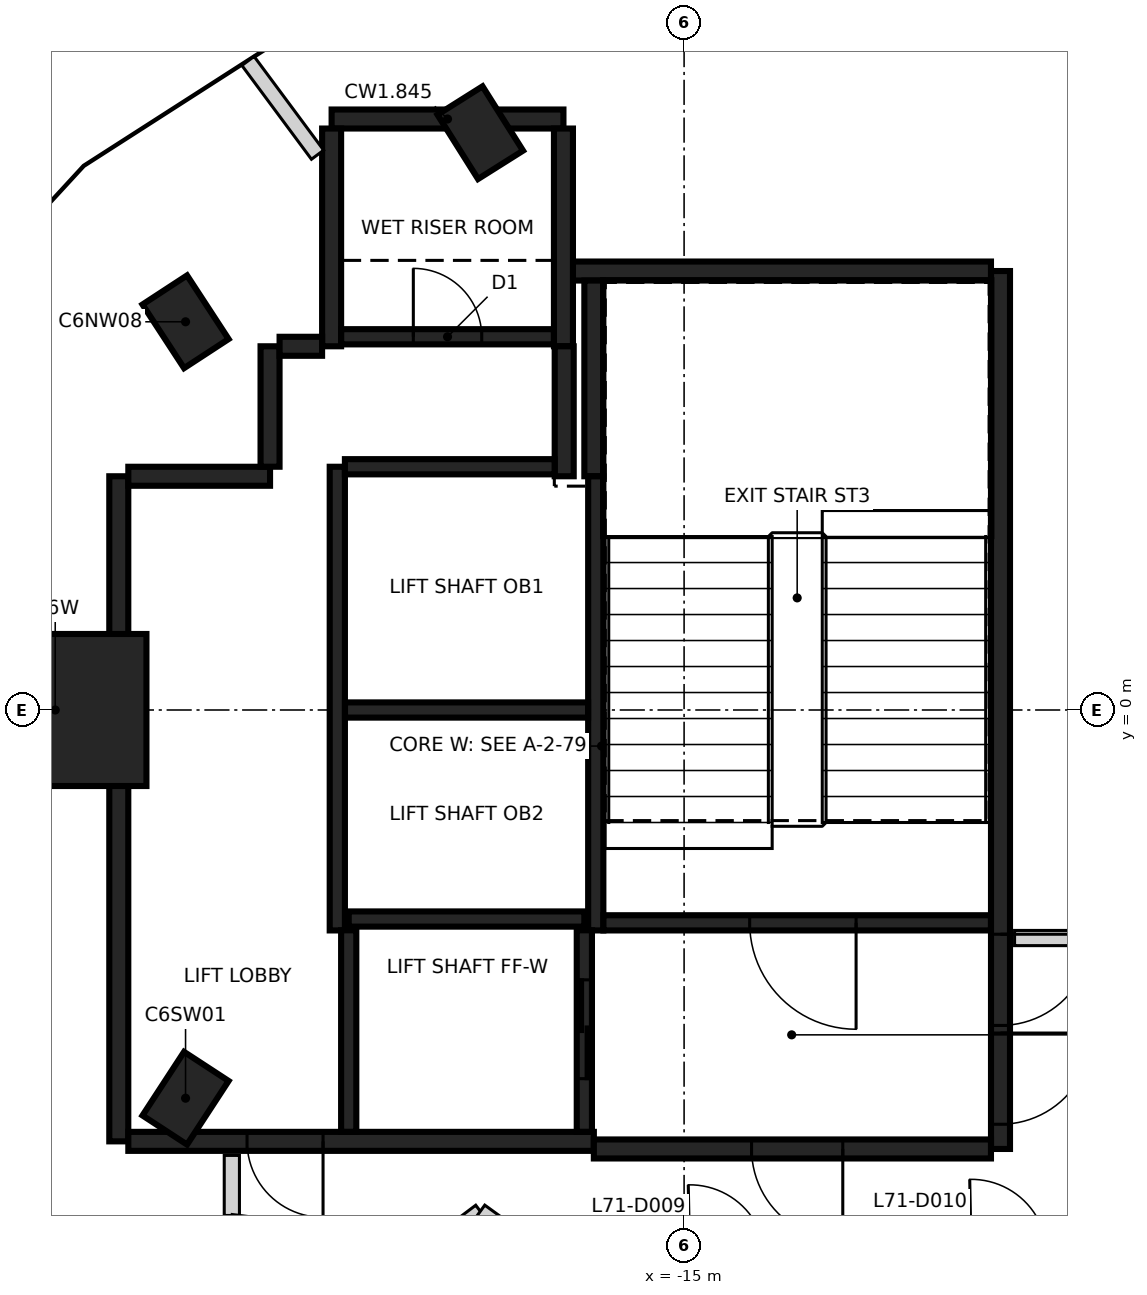
"""IFC4 building model, lengths in metres.
Left out: names, types, materials, properties, quantities, classifications, styles, units other than length and angle.
Written with IfcOpenShell. Run it as: python <this file> out.ifc"""

import sys

from ifc_helpers import new_model, si_unit, direction, frame, frame_2d, origin, origin_2d, place, context, subcontext, project, spatial, rectangle, extrude, element, fill, save


model = new_model("IFC4")
c1 = context("Model", 3, precision=1e-05, world=origin(), true_north=direction((0.0, 1.0)))
c2 = subcontext(c1, "Body", "Model", "MODEL_VIEW")
j1 = project(units=[si_unit("LENGTHUNIT", "METRE"), si_unit("PLANEANGLEUNIT", "RADIAN")], contexts=[c1])
p1 = place(None, origin())
s1 = spatial("IfcSite", under=j1, at=p1, CompositionType="ELEMENT")
p2 = place(p1, origin())
s2 = spatial("IfcBuilding", under=s1, at=p2, CompositionType="ELEMENT")
p3 = place(p2, frame((0.0, 0.0, 280.2)))
s3 = spatial("IfcBuildingStorey", under=s2, at=p3, CompositionType="ELEMENT", Elevation=280.2)
for number, where, z_axis, x_axis in (
    (1, (-17.681, 7.595, -0.35), (0.0, 0.0, 1.0), (-0.533, 0.846, 0.0)),
    (2, (-21.559, 5.107, -0.35), (0.0, 0.0, 1.0), (-0.547, 0.837, 0.0)),
    (3, (-21.559, -5.107, -0.35), (0.0, 0.0, 1.0), (0.547, 0.837, 0.0)),
):
    element("IfcColumn", number, at=place(p3, frame(where, z_axis=z_axis, x_axis=x_axis)), inside=s3, PredefinedType="COLUMN", context=c2, shape_type="SweptSolid", body=[
        extrude(rectangle(XDim=1.0, YDim=0.7, at=origin_2d()), origin(), (0.0, 0.0, 1.0), 3.6),
    ])
p4 = place(p3, frame((-23.273, 0.0, -0.35), z_axis=(0.0, 0.0, 1.0), x_axis=(1.0, 0.0, 0.0)))
e4 = element("IfcColumn", 4, at=p4, inside=s3, PredefinedType="COLUMN", context=c2, shape_type="SweptSolid", body=[
    extrude(rectangle(XDim=2.4, YDim=2.0, at=origin_2d()), origin(), (0.0, 0.0, 1.0), 3.6),
])
p5 = place(p3, frame((-10.837, 5.775, 0.0), z_axis=(0.0, 0.0, 1.0), x_axis=(0.0, -1.0, 0.0)))
e5 = element("IfcWall", 5, at=p5, inside=s3, PredefinedType="SHEAR", context=c2, shape_type="SweptSolid", body=[
    extrude(rectangle(XDim=11.55, YDim=0.25, at=frame_2d((5.775, 0.0))), origin(), (0.0, 0.0, 1.0), 3.25),
])
p6 = place(p5, frame((10.025, 0.0, 0.0)))
e6 = element("IfcOpeningElement", 6, at=p6, cuts=e5, PredefinedType="OPENING", context=c2, shape_type="SweptSolid", body=[
    extrude(rectangle(XDim=1.2, YDim=2.1, at=frame_2d((0.6, 1.05))), frame((0.0, 0.135, 0.0), z_axis=(0.0, -1.0, 0.0), x_axis=(1.0, 0.0, 0.0)), (0.0, 0.0, 1.0), 0.27),
])
p7 = place(p5, frame((8.725, 0.0, 0.0)))
e7 = element("IfcOpeningElement", 7, at=p7, cuts=e5, PredefinedType="OPENING", context=c2, shape_type="SweptSolid", body=[
    extrude(rectangle(XDim=1.2, YDim=2.1, at=frame_2d((0.6, 1.05))), frame((0.0, 0.135, 0.0), z_axis=(0.0, -1.0, 0.0), x_axis=(1.0, 0.0, 0.0)), (0.0, 0.0, 1.0), 0.27),
])
p8 = place(p3, frame((-22.437, -5.675, 0.0), z_axis=(0.0, 0.0, 1.0), x_axis=(0.0, 1.0, 0.0)))
e8 = element("IfcWall", 8, at=p8, inside=s3, PredefinedType="SHEAR", context=c2, shape_type="SweptSolid", body=[
    extrude(rectangle(XDim=8.75, YDim=0.25, at=frame_2d((4.375, 0.0))), origin(), (0.0, 0.0, 1.0), 3.25),
])
p9 = place(p3, frame((-16.187, -5.675, 0.0), z_axis=(0.0, 0.0, 1.0), x_axis=(-1.0, 0.0, 0.0)))
e9 = element("IfcWall", 9, at=p9, inside=s3, PredefinedType="SHEAR", context=c2, shape_type="SweptSolid", body=[
    extrude(rectangle(XDim=6.125, YDim=0.25, at=frame_2d((3.062, 0.0))), origin(), (0.0, 0.0, 1.0), 3.25),
])
p10 = place(p9, frame((3.563, 0.0, 0.0)))
e10 = element("IfcOpeningElement", 10, at=p10, cuts=e9, PredefinedType="OPENING", context=c2, shape_type="SweptSolid", body=[
    extrude(rectangle(XDim=1.0, YDim=2.1, at=frame_2d((0.5, 1.05))), frame((0.0, 0.135, 0.0), z_axis=(0.0, -1.0, 0.0), x_axis=(1.0, 0.0, 0.0)), (0.0, 0.0, 1.0), 0.27),
])
p11 = place(p3, frame((-10.963, -5.775, 0.0), z_axis=(0.0, 0.0, 1.0), x_axis=(-1.0, 0.0, 0.0)))
e11 = element("IfcWall", 11, at=p11, inside=s3, PredefinedType="SHEAR", context=c2, shape_type="SweptSolid", body=[
    extrude(rectangle(XDim=5.225, YDim=0.25, at=frame_2d((2.612, 0.0))), origin(), (0.0, 0.0, 1.0), 3.25),
])
p12 = place(p11, frame((1.95, 0.0, 0.0)))
e12 = element("IfcOpeningElement", 12, at=p12, cuts=e11, PredefinedType="OPENING", context=c2, shape_type="SweptSolid", body=[
    extrude(rectangle(XDim=1.2, YDim=2.1, at=frame_2d((0.6, 1.05))), frame((0.0, 0.135, 0.0), z_axis=(0.0, -1.0, 0.0), x_axis=(1.0, 0.0, 0.0)), (0.0, 0.0, 1.0), 0.27),
])
p13 = place(p3, frame((-16.472, 5.775, 0.0), z_axis=(0.0, 0.0, 1.0), x_axis=(1.0, 0.0, 0.0)))
e13 = element("IfcWall", 13, at=p13, inside=s3, PredefinedType="SHEAR", context=c2, shape_type="SweptSolid", body=[
    extrude(rectangle(XDim=5.51, YDim=0.25, at=frame_2d((2.755, 0.0))), origin(), (0.0, 0.0, 1.0), 3.25),
])
p14 = place(p3, frame((-19.637, 7.775, 0.0), z_axis=(0.0, 0.0, 1.0), x_axis=(1.0, 0.0, 0.0)))
e14 = element("IfcWall", 14, at=p14, inside=s3, PredefinedType="SHEAR", context=c2, shape_type="SweptSolid", body=[
    extrude(rectangle(XDim=3.05, YDim=0.25, at=frame_2d((1.525, 0.0))), origin(), (0.0, 0.0, 1.0), 3.25),
])
for number, where, z_axis, x_axis in (
    (15, (-16.587, 7.65, 0.0), (0.0, 0.0, 1.0), (0.0, -1.0, 0.0)),
    (16, (-19.637, 4.785, 0.0), (0.0, 0.0, 1.0), (0.0, 1.0, 0.0)),
):
    element("IfcWall", number, at=place(p3, frame(where, z_axis=z_axis, x_axis=x_axis)), inside=s3, PredefinedType="SHEAR", context=c2, shape_type="SweptSolid", body=[
        extrude(rectangle(XDim=2.865, YDim=0.25, at=frame_2d((1.432, 0.0))), origin(), (0.0, 0.0, 1.0), 3.25),
    ])
p15 = place(p3, frame((-16.187, 3.075, 0.0), z_axis=(0.0, 0.0, 1.0), x_axis=(0.0, 1.0, 0.0)))
e17 = element("IfcWall", 17, at=p15, inside=s3, PredefinedType="SHEAR", context=c2, shape_type="SweptSolid", body=[
    extrude(rectangle(XDim=2.575, YDim=0.25, at=frame_2d((1.287, 0.0))), origin(), (0.0, 0.0, 1.0), 3.25),
])
p16 = place(p3, frame((-22.312, 3.075, 0.0), z_axis=(0.0, 0.0, 1.0), x_axis=(1.0, 0.0, 0.0)))
e18 = element("IfcWall", 18, at=p16, inside=s3, PredefinedType="SHEAR", context=c2, shape_type="SweptSolid", body=[
    extrude(rectangle(XDim=1.865, YDim=0.25, at=frame_2d((0.932, 0.0))), origin(), (0.0, 0.0, 1.0), 3.25),
])
p17 = place(p3, frame((-16.577, 4.785, 0.0), z_axis=(0.0, 0.0, 1.0), x_axis=(0.0, -1.0, 0.0)))
e19 = element("IfcWall", 19, at=p17, inside=s3, PredefinedType="SHEAR", context=c2, shape_type="SweptSolid", body=[
    extrude(rectangle(XDim=1.71, YDim=0.25, at=frame_2d((0.855, 0.0))), origin(), (0.0, 0.0, 1.0), 3.25),
])
p18 = place(p3, frame((-20.447, 3.2, 0.0), z_axis=(0.0, 0.0, 1.0), x_axis=(0.0, 1.0, 0.0)))
e20 = element("IfcWall", 20, at=p18, inside=s3, PredefinedType="SHEAR", context=c2, shape_type="SweptSolid", body=[
    extrude(rectangle(XDim=1.584, YDim=0.25, at=frame_2d((0.792, 0.0))), origin(), (0.0, 0.0, 1.0), 3.25),
])
p19 = place(p3, frame((-20.322, 4.785, 0.0), z_axis=(0.0, 0.0, 1.0), x_axis=(1.0, 0.0, 0.0)))
e21 = element("IfcWall", 21, at=p19, inside=s3, PredefinedType="SHEAR", context=c2, shape_type="SweptSolid", body=[
    extrude(rectangle(XDim=0.559, YDim=0.25, at=frame_2d((0.28, 0.0))), origin(), (0.0, 0.0, 1.0), 3.25),
])
p20 = place(p3, frame((-16.162, 3.074, 0.0), z_axis=(0.0, 0.0, 1.0), x_axis=(0.0, -1.0, 0.0)))
e22 = element("IfcWall", 22, at=p20, inside=s3, PredefinedType="SHEAR", context=c2, shape_type="SweptSolid", body=[
    extrude(rectangle(XDim=5.974, YDim=0.2, at=frame_2d((2.987, 0.0))), origin(), (0.0, 0.0, 1.0), 3.25),
])
p21 = place(p3, frame((-19.562, -2.9, 0.0), z_axis=(0.0, 0.0, 1.0), x_axis=(0.0, 1.0, 0.0)))
e23 = element("IfcWall", 23, at=p21, inside=s3, PredefinedType="SHEAR", context=c2, shape_type="SweptSolid", body=[
    extrude(rectangle(XDim=6.1, YDim=0.2, at=frame_2d((3.05, 0.0))), origin(), (0.0, 0.0, 1.0), 3.25),
])
p22 = place(p3, frame((-10.963, -2.8, 0.0), z_axis=(0.0, 0.0, 1.0), x_axis=(-1.0, 0.0, 0.0)))
e24 = element("IfcWall", 24, at=p22, inside=s3, PredefinedType="SHEAR", context=c2, shape_type="SweptSolid", body=[
    extrude(rectangle(XDim=5.098, YDim=0.2, at=frame_2d((2.549, 0.0))), origin(), (0.0, 0.0, 1.0), 3.25),
])
p23 = place(p22, frame((1.774, 0.0, 0.0)))
e25 = element("IfcOpeningElement", 25, at=p23, cuts=e24, PredefinedType="OPENING", context=c2, shape_type="SweptSolid", body=[
    extrude(rectangle(XDim=1.4, YDim=2.1, at=frame_2d((0.7, 1.05))), frame((0.0, 0.11, 0.0), z_axis=(0.0, -1.0, 0.0), x_axis=(1.0, 0.0, 0.0)), (0.0, 0.0, 1.0), 0.22),
])
p24 = place(p3, frame((-16.263, 0.0, 0.0), z_axis=(0.0, 0.0, 1.0), x_axis=(-1.0, 0.0, 0.0)))
e26 = element("IfcWall", 26, at=p24, inside=s3, PredefinedType="SHEAR", context=c2, shape_type="SweptSolid", body=[
    extrude(rectangle(XDim=3.198, YDim=0.2, at=frame_2d((1.599, 0.0))), origin(), (0.0, 0.0, 1.0), 3.25),
])
p25 = place(p3, frame((-19.511, 4.91, 0.0), z_axis=(0.0, 0.0, 1.0), x_axis=(1.0, 0.0, 0.0)))
e27 = element("IfcWall", 27, at=p25, inside=s3, PredefinedType="SHEAR", context=c2, shape_type="SweptSolid", body=[
    extrude(rectangle(XDim=2.798, YDim=0.2, at=frame_2d((1.399, 0.0))), origin(), (0.0, 0.0, 1.0), 3.25),
])
p26 = place(p25, frame((0.949, 0.0, 0.0)))
e28 = element("IfcOpeningElement", 28, at=p26, cuts=e27, PredefinedType="OPENING", context=c2, shape_type="SweptSolid", body=[
    extrude(rectangle(XDim=0.9, YDim=2.1, at=frame_2d((0.45, 1.05))), frame((0.0, 0.11, 0.0), z_axis=(0.0, -1.0, 0.0), x_axis=(1.0, 0.0, 0.0)), (0.0, 0.0, 1.0), 0.22),
])
p27 = place(p3, frame((-19.462, 3.2, 0.0), z_axis=(0.0, 0.0, 1.0), x_axis=(1.0, 0.0, 0.0)))
e29 = element("IfcWall", 29, at=p27, inside=s3, PredefinedType="SHEAR", context=c2, shape_type="SweptSolid", body=[
    extrude(rectangle(XDim=2.759, YDim=0.2, at=frame_2d((1.379, 0.0))), origin(), (0.0, 0.0, 1.0), 3.25),
])
p28 = place(p3, frame((-19.412, -2.75, 0.0), z_axis=(0.0, 0.0, 1.0), x_axis=(1.0, 0.0, 0.0)))
e30 = element("IfcWall", 30, at=p28, inside=s3, PredefinedType="SHEAR", context=c2, shape_type="SweptSolid", body=[
    extrude(rectangle(XDim=3.1, YDim=0.2, at=frame_2d((1.55, 0.0))), origin(), (0.0, 0.0, 1.0), 3.25),
])
p29 = place(p3, frame((-16.312, -2.898, 0.0), z_axis=(0.0, 0.0, 1.0), x_axis=(0.0, -1.0, 0.0)))
e31 = element("IfcWall", 31, at=p29, inside=s3, PredefinedType="SHEAR", context=c2, shape_type="SweptSolid", body=[
    extrude(rectangle(XDim=2.651, YDim=0.2, at=frame_2d((1.325, 0.0))), origin(), (0.0, 0.0, 1.0), 3.25),
])
p30 = place(p29, frame((0.652, 0.0, 0.0)))
e32 = element("IfcOpeningElement", 32, at=p30, cuts=e31, PredefinedType="OPENING", context=c2, shape_type="SweptSolid", body=[
    extrude(rectangle(XDim=1.3, YDim=2.1, at=frame_2d((0.65, 1.05))), frame((0.0, 0.11, 0.0), z_axis=(0.0, -1.0, 0.0), x_axis=(1.0, 0.0, 0.0)), (0.0, 0.0, 1.0), 0.22),
])
p31 = place(p3, frame((-19.412, -5.549, 0.0), z_axis=(0.0, 0.0, 1.0), x_axis=(0.0, 1.0, 0.0)))
e33 = element("IfcWall", 33, at=p31, inside=s3, PredefinedType="SHEAR", context=c2, shape_type="SweptSolid", body=[
    extrude(rectangle(XDim=2.651, YDim=0.2, at=frame_2d((1.325, 0.0))), origin(), (0.0, 0.0, 1.0), 3.25),
])
p32 = place(p3, frame((-20.95, -6.65, 0.0), z_axis=(0.0, 0.0, 1.0), x_axis=(0.0, 1.0, 0.0)))
e34 = element("IfcWall", 34, at=p32, inside=s3, PredefinedType="PARTITIONING", context=c2, shape_type="SweptSolid", body=[
    extrude(rectangle(XDim=0.79, YDim=0.2, at=frame_2d((0.395, 0.0))), origin(), (0.0, 0.0, 1.0), 3.25),
])
p33 = place(p3, frame((-20.936, -7.363, 0.0), z_axis=(0.0, 0.0, 1.0), x_axis=(0.125330520795, 0.992115044013, 0.0)))
e35 = element("IfcWall", 35, at=p33, inside=s3, PredefinedType="PARTITIONING", context=c2, shape_type="SweptSolid", body=[
    extrude(rectangle(XDim=0.719, YDim=0.2, at=frame_2d((0.359, 0.0))), origin(), (0.0, 0.0, 1.0), 3.25),
])
p34 = place(p3, frame((-18.642, -7.319, 0.0), z_axis=(0.0, 0.0, 1.0), x_axis=(0.798707882989, 0.601718968998, 0.0)))
e36 = element("IfcWall", 36, at=p34, inside=s3, PredefinedType="PARTITIONING", context=c2, shape_type="SweptSolid", body=[
    extrude(rectangle(XDim=1.203, YDim=0.2, at=frame_2d((0.602, 0.0))), origin(), (0.0, 0.0, 1.0), 2.35),
])
p35 = place(p3, frame((-17.681, -6.595, 0.0), z_axis=(0.0, 0.0, 1.0), x_axis=(0.810123213102, -0.586259652026, 0.0)))
e37 = element("IfcWall", 37, at=p35, inside=s3, PredefinedType="PARTITIONING", context=c2, shape_type="SweptSolid", body=[
    extrude(rectangle(XDim=1.17, YDim=0.2, at=frame_2d((0.585, 0.0))), origin(), (0.0, 0.0, 1.0), 3.25),
])
p36 = place(p3, frame((-10.652, -3.0, 0.0), z_axis=(0.0, 0.0, 1.0), x_axis=(1.0, 0.0, 0.0)))
e38 = element("IfcWall", 38, at=p36, inside=s3, PredefinedType="PARTITIONING", context=c2, shape_type="SweptSolid", body=[
    extrude(rectangle(XDim=0.994, YDim=0.2, at=frame_2d((0.497, 0.0))), origin(), (0.0, 0.0, 1.0), 3.25),
])
p37 = place(p3, frame((-10.023, -7.151, 0.0), z_axis=(0.0, 0.0, 1.0), x_axis=(0.668804583793, 0.743438248073, 0.0)))
e39 = element("IfcWall", 39, at=p37, inside=s3, PredefinedType="PARTITIONING", context=c2, shape_type="SweptSolid", body=[
    extrude(rectangle(XDim=2.021, YDim=0.2, at=frame_2d((1.011, 0.0))), origin(), (0.0, 0.0, 1.0), 3.25),
])
p38 = place(p3, frame((-20.738, 8.539, 0.0), z_axis=(0.0, 0.0, 1.0), x_axis=(0.595694844153, -0.803210839475, 0.0)))
e40 = element("IfcWall", 40, at=p38, inside=s3, PredefinedType="PARTITIONING", context=c2, shape_type="SweptSolid", body=[
    extrude(rectangle(XDim=1.536, YDim=0.2, at=frame_2d((0.768, 0.0))), origin(), (0.0, 0.0, 1.0), 3.25),
])
p39 = place(p3, frame((-11.035, 14.505, 0.0), z_axis=(0.0, 0.0, 1.0), x_axis=(0.499989597041, -0.866031409852, 0.0)))
e41 = element("IfcWall", 41, at=p39, inside=s3, PredefinedType="PARTITIONING", context=c2, shape_type="SweptSolid", body=[
    extrude(rectangle(XDim=13.079, YDim=0.2, at=frame_2d((6.54, 0.0))), origin(), (0.0, 0.0, 1.0), 3.25),
])
p40 = place(p30, origin())
e42 = element("IfcDoor", 42, at=p40, inside=s3, OperationType="SLIDING_TO_LEFT", PredefinedType="DOOR", context=c2, shape_type="SweptSolid", body=[
    extrude(rectangle(XDim=1.3, YDim=2.1, at=frame_2d((0.65, 1.05))), frame((0.0, 0.025, 0.0), z_axis=(0.0, -1.0, 0.0), x_axis=(1.0, 0.0, 0.0)), (0.0, 0.0, 1.0), 0.05),
])
fill(e32, e42)
p41 = place(p10, origin())
e43 = element("IfcDoor", 43, at=p41, inside=s3, OperationType="SINGLE_SWING_LEFT", PredefinedType="DOOR", context=c2, shape_type="SweptSolid", body=[
    extrude(rectangle(XDim=1.0, YDim=2.1, at=frame_2d((0.5, 1.05))), frame((0.0, 0.025, 0.0), z_axis=(0.0, -1.0, 0.0), x_axis=(1.0, 0.0, 0.0)), (0.0, 0.0, 1.0), 0.05),
])
fill(e10, e43)
p42 = place(p6, origin())
e44 = element("IfcDoor", 44, at=p42, inside=s3, OperationType="SINGLE_SWING_LEFT", PredefinedType="DOOR", context=c2, shape_type="SweptSolid", body=[
    extrude(rectangle(XDim=1.2, YDim=2.1, at=frame_2d((0.6, 1.05))), frame((0.0, 0.025, 0.0), z_axis=(0.0, -1.0, 0.0), x_axis=(1.0, 0.0, 0.0)), (0.0, 0.0, 1.0), 0.05),
])
fill(e6, e44)
p43 = place(p7, origin())
e45 = element("IfcDoor", 45, at=p43, inside=s3, OperationType="SINGLE_SWING_RIGHT", PredefinedType="DOOR", context=c2, shape_type="SweptSolid", body=[
    extrude(rectangle(XDim=1.2, YDim=2.1, at=frame_2d((0.6, 1.05))), frame((0.0, 0.025, 0.0), z_axis=(0.0, -1.0, 0.0), x_axis=(1.0, 0.0, 0.0)), (0.0, 0.0, 1.0), 0.05),
])
fill(e7, e45)
p44 = place(p23, origin())
e46 = element("IfcDoor", 46, at=p44, inside=s3, OperationType="SINGLE_SWING_LEFT", PredefinedType="DOOR", context=c2, shape_type="SweptSolid", body=[
    extrude(rectangle(XDim=1.4, YDim=2.1, at=frame_2d((0.7, 1.05))), frame((0.0, 0.025, 0.0), z_axis=(0.0, -1.0, 0.0), x_axis=(1.0, 0.0, 0.0)), (0.0, 0.0, 1.0), 0.05),
])
fill(e25, e46)
p45 = place(p26, origin())
e47 = element("IfcDoor", 47, at=p45, inside=s3, OperationType="SINGLE_SWING_RIGHT", PredefinedType="DOOR", context=c2, shape_type="SweptSolid", body=[
    extrude(rectangle(XDim=0.9, YDim=2.1, at=frame_2d((0.45, 1.05))), frame((0.0, 0.025, 0.0), z_axis=(0.0, -1.0, 0.0), x_axis=(1.0, 0.0, 0.0)), (0.0, 0.0, 1.0), 0.05),
])
fill(e28, e47)
p46 = place(p12, origin())
e48 = element("IfcDoor", 48, at=p46, inside=s3, OperationType="SINGLE_SWING_RIGHT", PredefinedType="DOOR", context=c2, shape_type="SweptSolid", body=[
    extrude(rectangle(XDim=1.2, YDim=2.1, at=frame_2d((0.6, 1.05))), frame((0.0, 0.025, 0.0), z_axis=(0.0, -1.0, 0.0), x_axis=(1.0, 0.0, 0.0)), (0.0, 0.0, 1.0), 0.05),
])
fill(e12, e48)
save(model, sys.argv[1])
